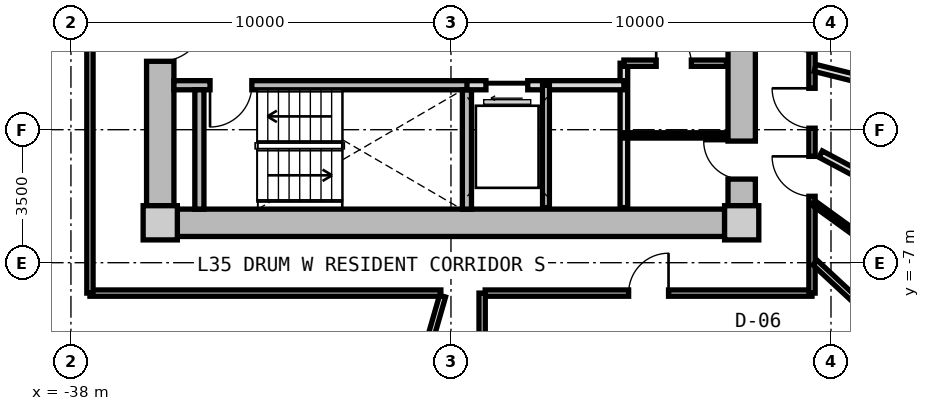
"""IFC4 building model, lengths in metres.
Left out: names, types, materials, properties, quantities, classifications, styles, units other than length and angle.
Written with IfcOpenShell. Run it as: python <this file> out.ifc"""

import sys

from ifc_helpers import new_model, si_unit, direction, frame, frame_2d, origin, origin_2d, place, context, subcontext, project, spatial, rectangle, extrude, source, transform, mapped, element, fill, save


model = new_model("IFC4")
c1 = context("Model", 3, precision=1e-05, world=origin(), true_north=direction((0.0, 1.0)))
c2 = subcontext(c1, "Body", "Model", "MODEL_VIEW")
j1 = project(units=[si_unit("LENGTHUNIT", "METRE"), si_unit("PLANEANGLEUNIT", "RADIAN")], contexts=[c1])
p1 = place(None, origin())
s1 = spatial("IfcSite", under=j1, at=p1, CompositionType="ELEMENT")
p2 = place(p1, origin())
s2 = spatial("IfcBuilding", under=s1, at=p2, CompositionType="ELEMENT")
p3 = place(p2, frame((0.0, 0.0, 114.55)))
s3 = spatial("IfcBuildingStorey", under=s2, at=p3, CompositionType="ELEMENT", Elevation=114.55)
m1 = source(origin(), c2, "Body", "SweptSolid", [
    extrude(rectangle(XDim=0.9, YDim=0.9, at=origin_2d()), origin(), (0.0, 0.0, 1.0), 3.05),
])
for number, where, z_axis, x_axis in (
    (1, (-35.65, -5.95, 0.0), (0.0, 0.0, 1.0), (1.0, 0.0, 0.0)),
    (2, (-20.35, -5.95, 0.0), (0.0, 0.0, 1.0), (1.0, 0.0, 0.0)),
):
    element("IfcColumn", number, at=place(p3, frame(where, z_axis=z_axis, x_axis=x_axis)), inside=s3, PredefinedType="COLUMN", context=c2, shape_type="MappedRepresentation", body=[
        mapped(m1, transform((0.0, 0.0, 0.0), x_axis=(1.0, 0.0, 0.0), y_axis=(0.0, 1.0, 0.0), z_axis=(0.0, 0.0, 1.0), scale=1.0)),
    ])
m2 = source(origin(), c2, "Body", "SweptSolid", [
    extrude(rectangle(XDim=14.4, YDim=0.72, at=frame_2d((7.2, 0.0))), origin(), (0.0, 0.0, 1.0), 2.79),
])
p4 = place(p3, frame((-20.8, -5.95, 0.0), z_axis=(0.0, 0.0, 1.0), x_axis=(-1.0, 0.0, 0.0)))
e3 = element("IfcWall", 3, at=p4, inside=s3, PredefinedType="SHEAR", context=c2, shape_type="MappedRepresentation", body=[
    mapped(m2, transform((0.0, 0.0, 0.0), x_axis=(1.0, 0.0, 0.0), y_axis=(0.0, 1.0, 0.0), z_axis=(0.0, 0.0, 1.0), scale=1.0)),
])
m3 = source(origin(), c2, "Body", "SweptSolid", [
    extrude(rectangle(XDim=11.0, YDim=0.72, at=frame_2d((5.5, 0.0))), origin(), (0.0, 0.0, 1.0), 2.79),
])
p5 = place(p3, frame((-35.65, -5.5, 0.0), z_axis=(0.0, 0.0, 1.0), x_axis=(0.0, 1.0, 0.0)))
e4 = element("IfcWall", 4, at=p5, inside=s3, PredefinedType="SHEAR", context=c2, shape_type="MappedRepresentation", body=[
    mapped(m3, transform((0.0, 0.0, 0.0), x_axis=(1.0, 0.0, 0.0), y_axis=(0.0, 1.0, 0.0), z_axis=(0.0, 0.0, 1.0), scale=1.0)),
])
p6 = place(p5, frame((3.8, 0.0, 0.0)))
e5 = element("IfcOpeningElement", 5, at=p6, cuts=e4, PredefinedType="OPENING", context=c2, shape_type="SweptSolid", body=[
    extrude(rectangle(XDim=1.2, YDim=2.15, at=frame_2d((0.6, 1.075))), frame((0.0, 0.37, 0.0), z_axis=(0.0, -1.0, 0.0), x_axis=(1.0, 0.0, 0.0)), (0.0, 0.0, 1.0), 0.74),
])
p7 = place(p3, frame((-20.35, 5.5, 0.0), z_axis=(0.0, 0.0, 1.0), x_axis=(0.0, -1.0, 0.0)))
e6 = element("IfcWall", 6, at=p7, inside=s3, PredefinedType="SHEAR", context=c2, shape_type="MappedRepresentation", body=[
    mapped(m3, transform((0.0, 0.0, 0.0), x_axis=(1.0, 0.0, 0.0), y_axis=(0.0, 1.0, 0.0), z_axis=(0.0, 0.0, 1.0), scale=1.0)),
])
p8 = place(p7, frame((5.65, 0.0, 0.0)))
e7 = element("IfcOpeningElement", 7, at=p8, cuts=e6, PredefinedType="OPENING", context=c2, shape_type="SweptSolid", body=[
    extrude(rectangle(XDim=1.2, YDim=2.15, at=frame_2d((0.6, 1.075))), frame((0.0, 0.37, 0.0), z_axis=(0.0, -1.0, 0.0), x_axis=(1.0, 0.0, 0.0)), (0.0, 0.0, 1.0), 0.74),
])
p9 = place(p7, frame((9.3, 0.0, 0.0)))
e8 = element("IfcOpeningElement", 8, at=p9, cuts=e6, PredefinedType="OPENING", context=c2, shape_type="SweptSolid", body=[
    extrude(rectangle(XDim=1.0, YDim=2.1, at=frame_2d((0.5, 1.05))), frame((0.0, 0.37, 0.0), z_axis=(0.0, -1.0, 0.0), x_axis=(1.0, 0.0, 0.0)), (0.0, 0.0, 1.0), 0.74),
])
m4 = source(origin(), c2, "Body", "SweptSolid", [
    extrude(rectangle(XDim=7.83, YDim=0.24, at=frame_2d((3.915, 0.0))), origin(), (0.0, 0.0, 1.0), 2.79),
])
p10 = place(p3, frame((-35.29, -2.33, 0.0), z_axis=(0.0, 0.0, 1.0), x_axis=(1.0, 0.0, 0.0)))
e9 = element("IfcWall", 9, at=p10, inside=s3, PredefinedType="PARTITIONING", context=c2, shape_type="MappedRepresentation", body=[
    mapped(m4, transform((0.0, 0.0, 0.0), x_axis=(1.0, 0.0, 0.0), y_axis=(0.0, 1.0, 0.0), z_axis=(0.0, 0.0, 1.0), scale=1.0)),
])
p11 = place(p10, frame((0.95, 0.0, 0.0)))
e10 = element("IfcOpeningElement", 10, at=p11, cuts=e9, PredefinedType="OPENING", context=c2, shape_type="SweptSolid", body=[
    extrude(rectangle(XDim=1.1, YDim=2.15, at=frame_2d((0.55, 1.075))), frame((0.0, 0.13, 0.0), z_axis=(0.0, -1.0, 0.0), x_axis=(1.0, 0.0, 0.0)), (0.0, 0.0, 1.0), 0.26),
])
m5 = source(origin(), c2, "Body", "SweptSolid", [
    extrude(rectangle(XDim=3.14, YDim=0.24, at=frame_2d((1.57, 0.0))), origin(), (0.0, 0.0, 1.0), 2.79),
])
for number, where, z_axis, x_axis in (
    (11, (-34.62, -5.59, 0.0), (0.0, 0.0, 1.0), (0.0, 1.0, 0.0)),
    (12, (-27.58, -5.59, 0.0), (0.0, 0.0, 1.0), (0.0, 1.0, 0.0)),
):
    element("IfcWall", number, at=place(p3, frame(where, z_axis=z_axis, x_axis=x_axis)), inside=s3, PredefinedType="PARTITIONING", context=c2, shape_type="MappedRepresentation", body=[
        mapped(m5, transform((0.0, 0.0, 0.0), x_axis=(1.0, 0.0, 0.0), y_axis=(0.0, 1.0, 0.0), z_axis=(0.0, 0.0, 1.0), scale=1.0)),
    ])
m6 = source(origin(), c2, "Body", "SweptSolid", [
    extrude(rectangle(XDim=3.8, YDim=0.2, at=frame_2d((1.9, 0.0))), origin(), (0.0, 0.0, 1.0), 2.775),
])
p12 = place(p3, frame((-23.45, -5.55, 0.0), z_axis=(0.0, 0.0, 1.0), x_axis=(0.0, 1.0, 0.0)))
e13 = element("IfcWall", 13, at=p12, inside=s3, PredefinedType="PARTITIONING", context=c2, shape_type="MappedRepresentation", body=[
    mapped(m6, transform((0.0, 0.0, 0.0), x_axis=(1.0, 0.0, 0.0), y_axis=(0.0, 1.0, 0.0), z_axis=(0.0, 0.0, 1.0), scale=1.0)),
])
m7 = source(origin(), c2, "Body", "SweptSolid", [
    extrude(rectangle(XDim=4.13, YDim=0.24, at=frame_2d((2.065, 0.0))), origin(), (0.0, 0.0, 1.0), 2.775),
])
p13 = place(p3, frame((-27.58, -2.33, 0.0), z_axis=(0.0, 0.0, 1.0), x_axis=(1.0, 0.0, 0.0)))
e14 = element("IfcWall", 14, at=p13, inside=s3, PredefinedType="PARTITIONING", context=c2, shape_type="MappedRepresentation", body=[
    mapped(m7, transform((0.0, 0.0, 0.0), x_axis=(1.0, 0.0, 0.0), y_axis=(0.0, 1.0, 0.0), z_axis=(0.0, 0.0, 1.0), scale=1.0)),
])
p14 = place(p13, frame((0.5, 0.0, 0.0)))
e15 = element("IfcOpeningElement", 15, at=p14, cuts=e14, PredefinedType="OPENING", context=c2, shape_type="SweptSolid", body=[
    extrude(rectangle(XDim=1.1, YDim=2.2, at=frame_2d((0.55, 1.1))), frame((0.0, 0.13, 0.0), z_axis=(0.0, -1.0, 0.0), x_axis=(1.0, 0.0, 0.0)), (0.0, 0.0, 1.0), 0.26),
])
m8 = source(origin(), c2, "Body", "SweptSolid", [
    extrude(rectangle(XDim=3.22, YDim=0.18, at=frame_2d((1.61, 0.0))), origin(), (0.0, 0.0, 1.0), 2.775),
])
p15 = place(p3, frame((-25.5, -5.55, 0.0), z_axis=(0.0, 0.0, 1.0), x_axis=(0.0, 1.0, 0.0)))
e16 = element("IfcWall", 16, at=p15, inside=s3, PredefinedType="PARTITIONING", context=c2, shape_type="MappedRepresentation", body=[
    mapped(m8, transform((0.0, 0.0, 0.0), x_axis=(1.0, 0.0, 0.0), y_axis=(0.0, 1.0, 0.0), z_axis=(0.0, 0.0, 1.0), scale=1.0)),
])
m9 = source(origin(), c2, "Body", "SweptSolid", [
    extrude(rectangle(XDim=2.7, YDim=0.165, at=frame_2d((1.35, 0.0))), origin(), (0.0, 0.0, 1.0), 2.775),
])
p16 = place(p3, frame((-23.45, -1.75, 0.0), z_axis=(0.0, 0.0, 1.0), x_axis=(1.0, 0.0, 0.0)))
e17 = element("IfcWall", 17, at=p16, inside=s3, PredefinedType="PARTITIONING", context=c2, shape_type="MappedRepresentation", body=[
    mapped(m9, transform((0.0, 0.0, 0.0), x_axis=(1.0, 0.0, 0.0), y_axis=(0.0, 1.0, 0.0), z_axis=(0.0, 0.0, 1.0), scale=1.0)),
])
p17 = place(p16, frame((0.85, 0.0, 0.0)))
e18 = element("IfcOpeningElement", 18, at=p17, cuts=e17, PredefinedType="OPENING", context=c2, shape_type="SweptSolid", body=[
    extrude(rectangle(XDim=0.925, YDim=2.1, at=frame_2d((0.462, 1.05))), frame((0.0, 0.093, 0.0), z_axis=(0.0, -1.0, 0.0), x_axis=(1.0, 0.0, 0.0)), (0.0, 0.0, 1.0), 0.185),
])
m10 = source(origin(), c2, "Body", "SweptSolid", [
    extrude(rectangle(XDim=2.7, YDim=0.14, at=frame_2d((1.35, 0.0))), origin(), (0.0, 0.0, 1.0), 2.775),
])
p18 = place(p3, frame((-23.45, -3.65, 0.0), z_axis=(0.0, 0.0, 1.0), x_axis=(1.0, 0.0, 0.0)))
e19 = element("IfcWall", 19, at=p18, inside=s3, PredefinedType="PARTITIONING", context=c2, shape_type="MappedRepresentation", body=[
    mapped(m10, transform((0.0, 0.0, 0.0), x_axis=(1.0, 0.0, 0.0), y_axis=(0.0, 1.0, 0.0), z_axis=(0.0, 0.0, 1.0), scale=1.0)),
])
m11 = source(origin(), c2, "Body", "SweptSolid", [
    extrude(rectangle(XDim=8.6, YDim=0.165, at=frame_2d((4.3, 0.0))), origin(), (0.0, 0.0, 1.0), 2.775),
])
p19 = place(p3, frame((-18.5, -7.8, 0.0), z_axis=(0.0, 0.0, 1.0), x_axis=(-1.0, 0.0, 0.0)))
e20 = element("IfcWall", 20, at=p19, inside=s3, PredefinedType="PARTITIONING", context=c2, shape_type="MappedRepresentation", body=[
    mapped(m11, transform((0.0, 0.0, 0.0), x_axis=(1.0, 0.0, 0.0), y_axis=(0.0, 1.0, 0.0), z_axis=(0.0, 0.0, 1.0), scale=1.0)),
])
p20 = place(p19, frame((3.775, 0.0, 0.0)))
e21 = element("IfcOpeningElement", 21, at=p20, cuts=e20, PredefinedType="OPENING", context=c2, shape_type="SweptSolid", body=[
    extrude(rectangle(XDim=1.05, YDim=2.15, at=frame_2d((0.525, 1.075))), frame((0.0, 0.093, 0.0), z_axis=(0.0, -1.0, 0.0), x_axis=(1.0, 0.0, 0.0)), (0.0, 0.0, 1.0), 0.185),
])
m12 = source(origin(), c2, "Body", "SweptSolid", [
    extrude(rectangle(XDim=9.234, YDim=0.165, at=frame_2d((4.617, 0.0))), origin(), (0.0, 0.0, 1.0), 2.775),
])
p21 = place(p3, frame((-28.266, -7.8, 0.0), z_axis=(0.0, 0.0, 1.0), x_axis=(-1.0, 0.0, 0.0)))
e22 = element("IfcWall", 22, at=p21, inside=s3, PredefinedType="PARTITIONING", context=c2, shape_type="MappedRepresentation", body=[
    mapped(m12, transform((0.0, 0.0, 0.0), x_axis=(1.0, 0.0, 0.0), y_axis=(0.0, 1.0, 0.0), z_axis=(0.0, 0.0, 1.0), scale=1.0)),
])
m13 = source(origin(), c2, "Body", "SweptSolid", [
    extrude(rectangle(XDim=15.6, YDim=0.165, at=frame_2d((7.8, 0.0))), origin(), (0.0, 0.0, 1.0), 2.775),
])
p22 = place(p3, frame((-37.5, -7.8, 0.0), z_axis=(0.0, 0.0, 1.0), x_axis=(0.0, 1.0, 0.0)))
e23 = element("IfcWall", 23, at=p22, inside=s3, PredefinedType="PARTITIONING", context=c2, shape_type="MappedRepresentation", body=[
    mapped(m13, transform((0.0, 0.0, 0.0), x_axis=(1.0, 0.0, 0.0), y_axis=(0.0, 1.0, 0.0), z_axis=(0.0, 0.0, 1.0), scale=1.0)),
])
p23 = place(p22, frame((7.175, 0.0, 0.0)))
e24 = element("IfcOpeningElement", 24, at=p23, cuts=e23, PredefinedType="OPENING", context=c2, shape_type="SweptSolid", body=[
    extrude(rectangle(XDim=1.25, YDim=2.2, at=frame_2d((0.625, 1.1))), frame((0.0, 0.093, 0.0), z_axis=(0.0, -1.0, 0.0), x_axis=(1.0, 0.0, 0.0)), (0.0, 0.0, 1.0), 0.185),
])
p24 = place(p3, frame((-18.5, 7.8, 0.0), z_axis=(0.0, 0.0, 1.0), x_axis=(0.0, -1.0, 0.0)))
e25 = element("IfcWall", 25, at=p24, inside=s3, PredefinedType="PARTITIONING", context=c2, shape_type="MappedRepresentation", body=[
    mapped(m13, transform((0.0, 0.0, 0.0), x_axis=(1.0, 0.0, 0.0), y_axis=(0.0, 1.0, 0.0), z_axis=(0.0, 0.0, 1.0), scale=1.0)),
])
p25 = place(p24, frame((12.002, 0.0, 0.0)))
e26 = element("IfcOpeningElement", 26, at=p25, cuts=e25, PredefinedType="OPENING", context=c2, shape_type="SweptSolid", body=[
    extrude(rectangle(XDim=1.05, YDim=2.15, at=frame_2d((0.525, 1.075))), frame((0.0, 0.093, 0.0), z_axis=(0.0, -1.0, 0.0), x_axis=(1.0, 0.0, 0.0)), (0.0, 0.0, 1.0), 0.185),
])
p26 = place(p24, frame((10.211, 0.0, 0.0)))
e27 = element("IfcOpeningElement", 27, at=p26, cuts=e25, PredefinedType="OPENING", context=c2, shape_type="SweptSolid", body=[
    extrude(rectangle(XDim=1.05, YDim=2.15, at=frame_2d((0.525, 1.075))), frame((0.0, 0.093, 0.0), z_axis=(0.0, -1.0, 0.0), x_axis=(1.0, 0.0, 0.0)), (0.0, 0.0, 1.0), 0.185),
])
p27 = place(p24, frame((8.212, 0.0, 0.0)))
e28 = element("IfcOpeningElement", 28, at=p27, cuts=e25, PredefinedType="OPENING", context=c2, shape_type="SweptSolid", body=[
    extrude(rectangle(XDim=1.05, YDim=2.15, at=frame_2d((0.525, 1.075))), frame((0.0, 0.093, 0.0), z_axis=(0.0, -1.0, 0.0), x_axis=(1.0, 0.0, 0.0)), (0.0, 0.0, 1.0), 0.185),
])
p28 = place(p24, frame((6.291, 0.0, 0.0)))
e29 = element("IfcOpeningElement", 29, at=p28, cuts=e25, PredefinedType="OPENING", context=c2, shape_type="SweptSolid", body=[
    extrude(rectangle(XDim=1.05, YDim=2.15, at=frame_2d((0.525, 1.075))), frame((0.0, 0.093, 0.0), z_axis=(0.0, -1.0, 0.0), x_axis=(1.0, 0.0, 0.0)), (0.0, 0.0, 1.0), 0.185),
])
p29 = place(p24, frame((4.739, 0.0, 0.0)))
e30 = element("IfcOpeningElement", 30, at=p29, cuts=e25, PredefinedType="OPENING", context=c2, shape_type="SweptSolid", body=[
    extrude(rectangle(XDim=0.92, YDim=2.1, at=frame_2d((0.46, 1.05))), frame((0.0, 0.093, 0.0), z_axis=(0.0, -1.0, 0.0), x_axis=(1.0, 0.0, 0.0)), (0.0, 0.0, 1.0), 0.185),
])
p30 = place(p24, frame((2.096, 0.0, 0.0)))
e31 = element("IfcOpeningElement", 31, at=p30, cuts=e25, PredefinedType="OPENING", context=c2, shape_type="SweptSolid", body=[
    extrude(rectangle(XDim=0.92, YDim=2.1, at=frame_2d((0.46, 1.05))), frame((0.0, 0.093, 0.0), z_axis=(0.0, -1.0, 0.0), x_axis=(1.0, 0.0, 0.0)), (0.0, 0.0, 1.0), 0.185),
])
m14 = source(origin(), c2, "Body", "SweptSolid", [
    extrude(rectangle(XDim=8.989, YDim=0.165, at=frame_2d((4.495, 0.0))), origin(), (0.0, 0.0, 1.0), 2.275),
])
p31 = place(p3, frame((-28.222, -7.88, 0.0), z_axis=(0.0, 0.0, 1.0), x_axis=(-0.27702323008, -0.960863221274, 0.0)))
e32 = element("IfcWall", 32, at=p31, inside=s3, PredefinedType="PARTITIONING", context=c2, shape_type="MappedRepresentation", body=[
    mapped(m14, transform((0.0, 0.0, 0.0), x_axis=(1.0, 0.0, 0.0), y_axis=(0.0, 1.0, 0.0), z_axis=(0.0, 0.0, 1.0), scale=1.0)),
])
m15 = source(origin(), c2, "Body", "SweptSolid", [
    extrude(rectangle(XDim=7.482, YDim=0.165, at=frame_2d((3.741, 0.0))), origin(), (0.0, 0.0, 1.0), 2.275),
])
p32 = place(p3, frame((-18.42, -6.998, 0.0), z_axis=(0.0, 0.0, 1.0), x_axis=(0.732508698043, -0.680757671489, 0.0)))
e33 = element("IfcWall", 33, at=p32, inside=s3, PredefinedType="PARTITIONING", context=c2, shape_type="MappedRepresentation", body=[
    mapped(m15, transform((0.0, 0.0, 0.0), x_axis=(1.0, 0.0, 0.0), y_axis=(0.0, 1.0, 0.0), z_axis=(0.0, 0.0, 1.0), scale=1.0)),
])
m16 = source(origin(), c2, "Body", "SweptSolid", [
    extrude(rectangle(XDim=7.56, YDim=0.165, at=frame_2d((3.78, 0.0))), origin(), (0.0, 0.0, 1.0), 2.775),
])
p33 = place(p3, frame((-27.18, -15.36, 0.0), z_axis=(0.0, 0.0, 1.0), x_axis=(0.0, 1.0, 0.0)))
e34 = element("IfcWall", 34, at=p33, inside=s3, PredefinedType="PARTITIONING", context=c2, shape_type="MappedRepresentation", body=[
    mapped(m16, transform((0.0, 0.0, 0.0), x_axis=(1.0, 0.0, 0.0), y_axis=(0.0, 1.0, 0.0), z_axis=(0.0, 0.0, 1.0), scale=1.0)),
])
m17 = source(origin(), c2, "Body", "SweptSolid", [
    extrude(rectangle(XDim=10.556, YDim=0.19, at=frame_2d((5.278, 0.0))), origin(), (0.0, 0.0, 1.0), 2.275),
])
p34 = place(p3, frame((-18.42, -1.875, 0.0), z_axis=(0.0, 0.0, 1.0), x_axis=(0.970363857851, -0.241648470667, 0.0)))
e35 = element("IfcWall", 35, at=p34, inside=s3, PredefinedType="PARTITIONING", context=c2, shape_type="MappedRepresentation", body=[
    mapped(m17, transform((0.0, 0.0, 0.0), x_axis=(1.0, 0.0, 0.0), y_axis=(0.0, 1.0, 0.0), z_axis=(0.0, 0.0, 1.0), scale=1.0)),
])
m18 = source(origin(), c2, "Body", "SweptSolid", [
    extrude(rectangle(XDim=8.744, YDim=0.19, at=frame_2d((4.372, 0.0))), origin(), (0.0, 0.0, 1.0), 2.775),
])
p35 = place(p3, frame((-18.273, -4.142, 0.0), z_axis=(0.0, 0.0, 1.0), x_axis=(0.882252449936, -0.470776607938, 0.0)))
e36 = element("IfcWall", 36, at=p35, inside=s3, PredefinedType="PARTITIONING", context=c2, shape_type="MappedRepresentation", body=[
    mapped(m18, transform((0.0, 0.0, 0.0), x_axis=(1.0, 0.0, 0.0), y_axis=(0.0, 1.0, 0.0), z_axis=(0.0, 0.0, 1.0), scale=1.0)),
])
m19 = source(origin(), c2, "Body", "SweptSolid", [
    extrude(rectangle(XDim=3.621, YDim=0.14, at=frame_2d((1.811, 0.0))), origin(), (0.0, 0.0, 1.0), 2.775),
])
p36 = place(p3, frame((-18.47, -5.422, 0.0), z_axis=(0.0, 0.0, 1.0), x_axis=(0.80968252222, -0.586868139544, 0.0)))
e37 = element("IfcWall", 37, at=p36, inside=s3, PredefinedType="PARTITIONING", context=c2, shape_type="MappedRepresentation", body=[
    mapped(m19, transform((0.0, 0.0, 0.0), x_axis=(1.0, 0.0, 0.0), y_axis=(0.0, 1.0, 0.0), z_axis=(0.0, 0.0, 1.0), scale=1.0)),
])
p37 = place(p36, frame((1.351, 0.0, 0.0)))
e38 = element("IfcOpeningElement", 38, at=p37, cuts=e37, PredefinedType="OPENING", context=c2, shape_type="SweptSolid", body=[
    extrude(rectangle(XDim=0.92, YDim=2.1, at=frame_2d((0.46, 1.05))), frame((0.0, 0.08, 0.0), z_axis=(0.0, -1.0, 0.0), x_axis=(1.0, 0.0, 0.0)), (0.0, 0.0, 1.0), 0.16),
])
m20 = source(origin(), c2, "Body", "SweptSolid", [
    extrude(rectangle(XDim=1.1, YDim=2.15, at=frame_2d((0.55, 1.075))), frame((0.0, 0.025, 0.0), z_axis=(0.0, -1.0, 0.0), x_axis=(1.0, 0.0, 0.0)), (0.0, 0.0, 1.0), 0.05),
])
p38 = place(p11, frame((1.1, 0.0, 0.0), z_axis=(0.0, 0.0, 1.0), x_axis=(-1.0, 0.0, 0.0)))
e39 = element("IfcDoor", 39, at=p38, inside=s3, OperationType="SINGLE_SWING_RIGHT", PredefinedType="DOOR", context=c2, shape_type="MappedRepresentation", body=[
    mapped(m20, transform((0.0, 0.0, 0.0), x_axis=(1.0, 0.0, 0.0), y_axis=(0.0, 1.0, 0.0), z_axis=(0.0, 0.0, 1.0), scale=1.0)),
])
fill(e10, e39)
m21 = source(origin(), c2, "Body", "SweptSolid", [
    extrude(rectangle(XDim=1.2, YDim=2.15, at=frame_2d((0.6, 1.075))), frame((0.0, 0.025, 0.0), z_axis=(0.0, -1.0, 0.0), x_axis=(1.0, 0.0, 0.0)), (0.0, 0.0, 1.0), 0.05),
])
p39 = place(p6, frame((1.2, 0.0, 0.0), z_axis=(0.0, 0.0, 1.0), x_axis=(-1.0, 0.0, 0.0)))
e40 = element("IfcDoor", 40, at=p39, inside=s3, OperationType="SINGLE_SWING_LEFT", PredefinedType="DOOR", context=c2, shape_type="MappedRepresentation", body=[
    mapped(m21, transform((0.0, 0.0, 0.0), x_axis=(1.0, 0.0, 0.0), y_axis=(0.0, 1.0, 0.0), z_axis=(0.0, 0.0, 1.0), scale=1.0)),
])
fill(e5, e40)
m22 = source(origin(), c2, "Body", "SweptSolid", [
    extrude(rectangle(XDim=1.1, YDim=2.2, at=frame_2d((0.55, 1.1))), frame((0.0, 0.025, 0.0), z_axis=(0.0, -1.0, 0.0), x_axis=(1.0, 0.0, 0.0)), (0.0, 0.0, 1.0), 0.05),
])
p40 = place(p14, frame((1.1, 0.0, 0.0), z_axis=(0.0, 0.0, 1.0), x_axis=(-1.0, 0.0, 0.0)))
e41 = element("IfcDoor", 41, at=p40, inside=s3, OperationType="SLIDING_TO_LEFT", PredefinedType="DOOR", context=c2, shape_type="MappedRepresentation", body=[
    mapped(m22, transform((0.0, 0.0, 0.0), x_axis=(1.0, 0.0, 0.0), y_axis=(0.0, 1.0, 0.0), z_axis=(0.0, 0.0, 1.0), scale=1.0)),
])
fill(e15, e41)
m23 = source(origin(), c2, "Body", "SweptSolid", [
    extrude(rectangle(XDim=0.925, YDim=2.1, at=frame_2d((0.462, 1.05))), frame((0.0, 0.025, 0.0), z_axis=(0.0, -1.0, 0.0), x_axis=(1.0, 0.0, 0.0)), (0.0, 0.0, 1.0), 0.05),
])
p41 = place(p17, origin())
e42 = element("IfcDoor", 42, at=p41, inside=s3, OperationType="SINGLE_SWING_LEFT", PredefinedType="DOOR", context=c2, shape_type="MappedRepresentation", body=[
    mapped(m23, transform((0.0, 0.0, 0.0), x_axis=(1.0, 0.0, 0.0), y_axis=(0.0, 1.0, 0.0), z_axis=(0.0, 0.0, 1.0), scale=1.0)),
])
fill(e18, e42)
m24 = source(origin(), c2, "Body", "SweptSolid", [
    extrude(rectangle(XDim=1.0, YDim=2.1, at=frame_2d((0.5, 1.05))), frame((0.0, 0.025, 0.0), z_axis=(0.0, -1.0, 0.0), x_axis=(1.0, 0.0, 0.0)), (0.0, 0.0, 1.0), 0.05),
])
p42 = place(p9, frame((1.0, 0.0, 0.0), z_axis=(0.0, 0.0, 1.0), x_axis=(-1.0, 0.0, 0.0)))
e43 = element("IfcDoor", 43, at=p42, inside=s3, OperationType="SINGLE_SWING_RIGHT", PredefinedType="DOOR", context=c2, shape_type="MappedRepresentation", body=[
    mapped(m24, transform((0.0, 0.0, 0.0), x_axis=(1.0, 0.0, 0.0), y_axis=(0.0, 1.0, 0.0), z_axis=(0.0, 0.0, 1.0), scale=1.0)),
])
fill(e8, e43)
m25 = source(origin(), c2, "Body", "SweptSolid", [
    extrude(rectangle(XDim=1.05, YDim=2.15, at=frame_2d((0.525, 1.075))), frame((0.0, 0.025, 0.0), z_axis=(0.0, -1.0, 0.0), x_axis=(1.0, 0.0, 0.0)), (0.0, 0.0, 1.0), 0.05),
])
p43 = place(p20, frame((1.05, 0.0, 0.0), z_axis=(0.0, 0.0, 1.0), x_axis=(-1.0, 0.0, 0.0)))
e44 = element("IfcDoor", 44, at=p43, inside=s3, OperationType="SINGLE_SWING_RIGHT", PredefinedType="DOOR", context=c2, shape_type="MappedRepresentation", body=[
    mapped(m25, transform((0.0, 0.0, 0.0), x_axis=(1.0, 0.0, 0.0), y_axis=(0.0, 1.0, 0.0), z_axis=(0.0, 0.0, 1.0), scale=1.0)),
])
fill(e21, e44)
p44 = place(p25, frame((1.05, 0.0, 0.0), z_axis=(0.0, 0.0, 1.0), x_axis=(-1.0, 0.0, 0.0)))
e45 = element("IfcDoor", 45, at=p44, inside=s3, OperationType="SINGLE_SWING_RIGHT", PredefinedType="DOOR", context=c2, shape_type="MappedRepresentation", body=[
    mapped(m25, transform((0.0, 0.0, 0.0), x_axis=(1.0, 0.0, 0.0), y_axis=(0.0, 1.0, 0.0), z_axis=(0.0, 0.0, 1.0), scale=1.0)),
])
fill(e26, e45)
p45 = place(p26, frame((1.05, 0.0, 0.0), z_axis=(0.0, 0.0, 1.0), x_axis=(-1.0, 0.0, 0.0)))
e46 = element("IfcDoor", 46, at=p45, inside=s3, OperationType="SINGLE_SWING_RIGHT", PredefinedType="DOOR", context=c2, shape_type="MappedRepresentation", body=[
    mapped(m25, transform((0.0, 0.0, 0.0), x_axis=(1.0, 0.0, 0.0), y_axis=(0.0, 1.0, 0.0), z_axis=(0.0, 0.0, 1.0), scale=1.0)),
])
fill(e27, e46)
p46 = place(p27, frame((1.05, 0.0, 0.0), z_axis=(0.0, 0.0, 1.0), x_axis=(-1.0, 0.0, 0.0)))
e47 = element("IfcDoor", 47, at=p46, inside=s3, OperationType="SINGLE_SWING_RIGHT", PredefinedType="DOOR", context=c2, shape_type="MappedRepresentation", body=[
    mapped(m25, transform((0.0, 0.0, 0.0), x_axis=(1.0, 0.0, 0.0), y_axis=(0.0, 1.0, 0.0), z_axis=(0.0, 0.0, 1.0), scale=1.0)),
])
fill(e28, e47)
save(model, sys.argv[1])
